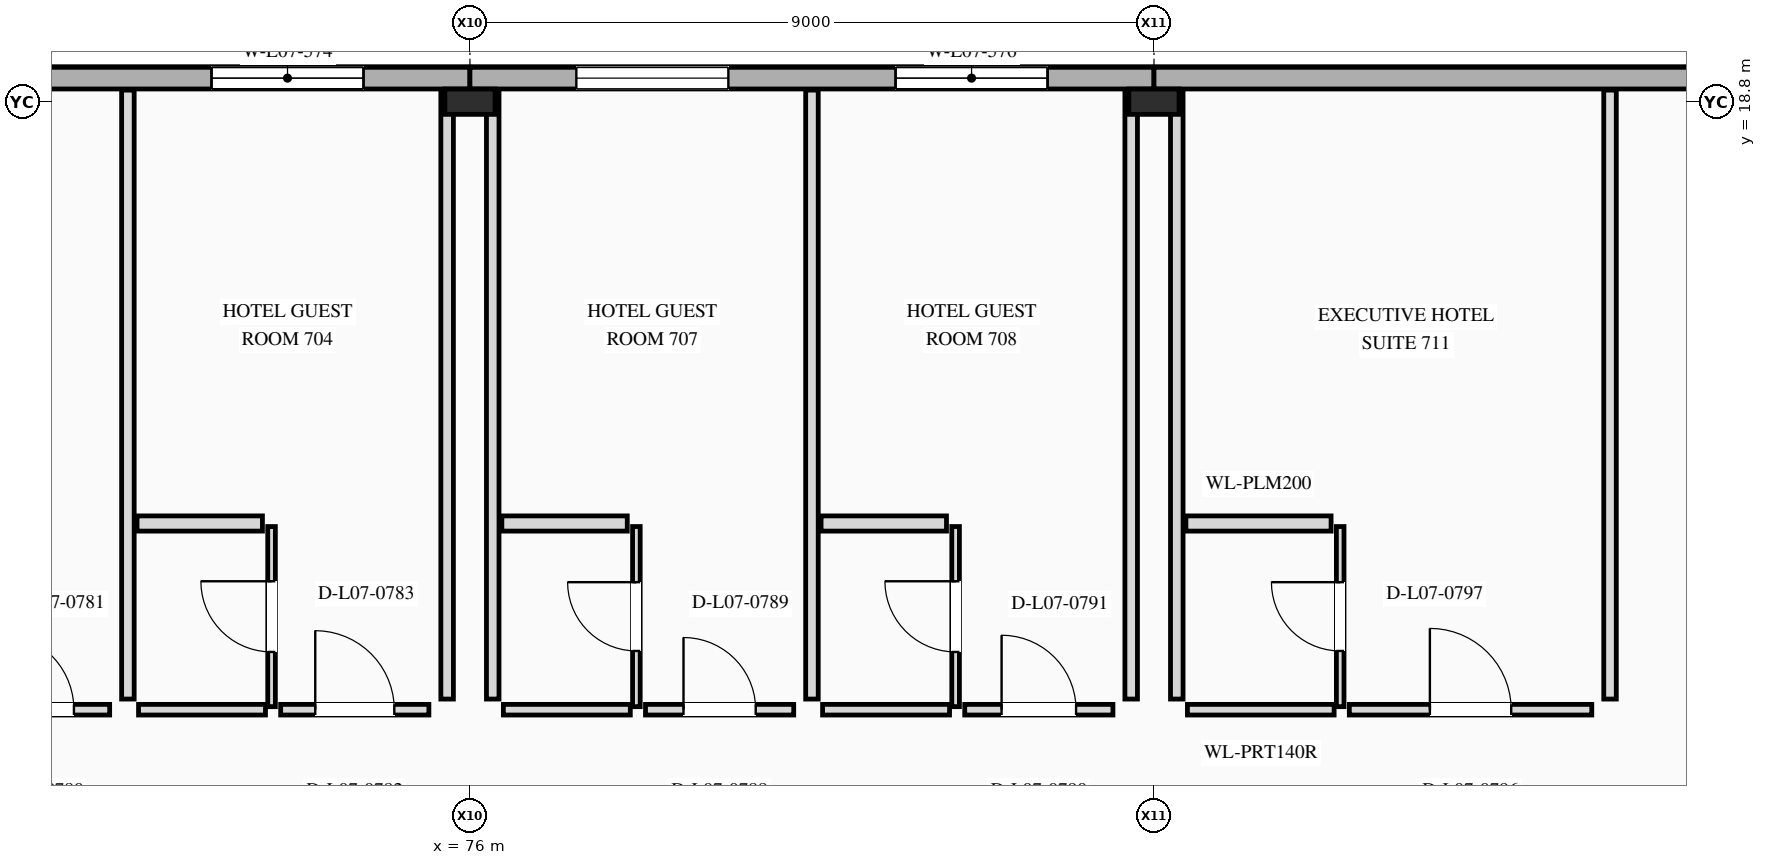
"""IFC4 building model, lengths in metres.
Left out: names, types, materials, properties, quantities, classifications, styles, units other than length and angle.
Written with IfcOpenShell. Run it as: python <this file> out.ifc"""

import sys

from ifc_helpers import new_model, si_unit, direction, frame, frame_2d, origin, origin_2d, place, context, subcontext, project, spatial, rectangle, i_section, extrude, element, fill, save


model = new_model("IFC4")
c1 = context("Model", 3, precision=1e-05, world=origin(), true_north=direction((0.0, 1.0)))
c2 = subcontext(c1, "Body", "Model", "MODEL_VIEW")
j1 = project(units=[si_unit("LENGTHUNIT", "METRE"), si_unit("PLANEANGLEUNIT", "RADIAN")], contexts=[c1])
p1 = place(None, origin())
s1 = spatial("IfcSite", under=j1, at=p1, CompositionType="ELEMENT")
p2 = place(p1, origin())
s2 = spatial("IfcBuilding", under=s1, at=p2, CompositionType="ELEMENT")
p3 = place(p2, frame((0.0, 0.0, 30.6)))
s3 = spatial("IfcBuildingStorey", under=s2, at=p3, CompositionType="ELEMENT", Elevation=30.6)
for number, where, z_axis, x_axis in (
    (1, (76.0, 18.8, 0.0), (0.0, 0.0, 1.0), (0.0, 1.0, 0.0)),
    (2, (85.0, 18.8, 0.0), (0.0, 0.0, 1.0), (0.0, 1.0, 0.0)),
):
    element("IfcColumn", number, at=place(p3, frame(where, z_axis=z_axis, x_axis=x_axis)), inside=s3, PredefinedType="COLUMN", context=c2, shape_type="SweptSolid", body=[
        extrude(i_section(OverallWidth=0.333, OverallDepth=0.66, WebThickness=0.024, FlangeThickness=0.044, at=origin_2d()), origin(), (0.0, 0.0, 1.0), 3.5),
    ])
p4 = place(p3, frame((76.0, 19.11, 0.0), z_axis=(0.0, 0.0, 1.0), x_axis=(-1.0, 0.0, 0.0)))
e3 = element("IfcWall", 3, at=p4, inside=s3, PredefinedType="STANDARD", context=c2, shape_type="SweptSolid", body=[
    extrude(rectangle(XDim=9.31, YDim=0.285, at=frame_2d((4.655, 0.0))), origin(), (0.0, 0.0, 1.0), 3.5),
])
p5 = place(p4, frame((5.6, 0.0, 0.85)))
e4 = element("IfcOpeningElement", 4, at=p5, cuts=e3, PredefinedType="OPENING", context=c2, shape_type="SweptSolid", body=[
    extrude(rectangle(XDim=2.0, YDim=1.65, at=frame_2d((1.0, 0.825))), frame((0.0, 0.152, 0.0), z_axis=(0.0, -1.0, 0.0), x_axis=(1.0, 0.0, 0.0)), (0.0, 0.0, 1.0), 0.305),
])
p6 = place(p4, frame((1.4, 0.0, 0.85)))
e5 = element("IfcOpeningElement", 5, at=p6, cuts=e3, PredefinedType="OPENING", context=c2, shape_type="SweptSolid", body=[
    extrude(rectangle(XDim=2.0, YDim=1.65, at=frame_2d((1.0, 0.825))), frame((0.0, 0.152, 0.0), z_axis=(0.0, -1.0, 0.0), x_axis=(1.0, 0.0, 0.0)), (0.0, 0.0, 1.0), 0.305),
])
p7 = place(p3, frame((85.0, 19.11, 0.0), z_axis=(0.0, 0.0, 1.0), x_axis=(-1.0, 0.0, 0.0)))
e6 = element("IfcWall", 6, at=p7, inside=s3, PredefinedType="STANDARD", context=c2, shape_type="SweptSolid", body=[
    extrude(rectangle(XDim=9.0, YDim=0.285, at=frame_2d((4.5, 0.0))), origin(), (0.0, 0.0, 1.0), 3.5),
])
p8 = place(p7, frame((5.6, 0.0, 0.85)))
e7 = element("IfcOpeningElement", 7, at=p8, cuts=e6, PredefinedType="OPENING", context=c2, shape_type="SweptSolid", body=[
    extrude(rectangle(XDim=2.0, YDim=1.65, at=frame_2d((1.0, 0.825))), frame((0.0, 0.152, 0.0), z_axis=(0.0, -1.0, 0.0), x_axis=(1.0, 0.0, 0.0)), (0.0, 0.0, 1.0), 0.305),
])
p9 = place(p7, frame((1.4, 0.0, 0.85)))
e8 = element("IfcOpeningElement", 8, at=p9, cuts=e6, PredefinedType="OPENING", context=c2, shape_type="SweptSolid", body=[
    extrude(rectangle(XDim=2.0, YDim=1.65, at=frame_2d((1.0, 0.825))), frame((0.0, 0.152, 0.0), z_axis=(0.0, -1.0, 0.0), x_axis=(1.0, 0.0, 0.0)), (0.0, 0.0, 1.0), 0.305),
])
p10 = place(p3, frame((94.0, 19.11, 0.0), z_axis=(0.0, 0.0, 1.0), x_axis=(-1.0, 0.0, 0.0)))
e9 = element("IfcWall", 9, at=p10, inside=s3, PredefinedType="STANDARD", context=c2, shape_type="SweptSolid", body=[
    extrude(rectangle(XDim=9.0, YDim=0.285, at=frame_2d((4.5, 0.0))), origin(), (0.0, 0.0, 1.0), 3.5),
])
p11 = place(p3, frame((69.31, 10.8, 0.0), z_axis=(0.0, 0.0, 1.0), x_axis=(1.0, 0.0, 0.0)))
e10 = element("IfcWall", 10, at=p11, inside=s3, PredefinedType="PARTITIONING", context=c2, shape_type="SweptSolid", body=[
    extrude(rectangle(XDim=1.95, YDim=0.14, at=frame_2d((0.975, 0.0))), origin(), (0.0, 0.0, 1.0), 3.2),
])
p12 = place(p11, frame((0.47, 0.0, 0.0)))
e11 = element("IfcOpeningElement", 11, at=p12, cuts=e10, PredefinedType="OPENING", context=c2, shape_type="SweptSolid", body=[
    extrude(rectangle(XDim=1.01, YDim=2.35, at=frame_2d((0.505, 1.175))), frame((0.0, 0.08, 0.0), z_axis=(0.0, -1.0, 0.0), x_axis=(1.0, 0.0, 0.0)), (0.0, 0.0, 1.0), 0.16),
])
p13 = place(p3, frame((71.5, 10.94, 0.0), z_axis=(0.0, 0.0, 1.0), x_axis=(0.0, 1.0, 0.0)))
e12 = element("IfcWall", 12, at=p13, inside=s3, PredefinedType="PARTITIONING", context=c2, shape_type="SweptSolid", body=[
    extrude(rectangle(XDim=8.012, YDim=0.165, at=frame_2d((4.006, 0.0))), origin(), (0.0, 0.0, 1.0), 2.613),
])
p14 = place(p3, frame((71.64, 10.8, 0.0), z_axis=(0.0, 0.0, 1.0), x_axis=(1.0, 0.0, 0.0)))
e13 = element("IfcWall", 13, at=p14, inside=s3, PredefinedType="PARTITIONING", context=c2, shape_type="SweptSolid", body=[
    extrude(rectangle(XDim=1.67, YDim=0.14, at=frame_2d((0.835, 0.0))), origin(), (0.0, 0.0, 1.0), 3.2),
])
p15 = place(p3, frame((73.51, 10.8, 0.0), z_axis=(0.0, 0.0, 1.0), x_axis=(1.0, 0.0, 0.0)))
e14 = element("IfcWall", 14, at=p15, inside=s3, PredefinedType="PARTITIONING", context=c2, shape_type="SweptSolid", body=[
    extrude(rectangle(XDim=1.95, YDim=0.14, at=frame_2d((0.975, 0.0))), origin(), (0.0, 0.0, 1.0), 3.2),
])
p16 = place(p15, frame((0.455, 0.0, 0.0)))
e15 = element("IfcOpeningElement", 15, at=p16, cuts=e14, PredefinedType="OPENING", context=c2, shape_type="SweptSolid", body=[
    extrude(rectangle(XDim=1.04, YDim=2.4, at=frame_2d((0.52, 1.2))), frame((0.0, 0.08, 0.0), z_axis=(0.0, -1.0, 0.0), x_axis=(1.0, 0.0, 0.0)), (0.0, 0.0, 1.0), 0.16),
])
p17 = place(p3, frame((75.7, 10.94, 0.0), z_axis=(0.0, 0.0, 1.0), x_axis=(0.0, 1.0, 0.0)))
e16 = element("IfcWall", 16, at=p17, inside=s3, PredefinedType="PARTITIONING", context=c2, shape_type="SweptSolid", body=[
    extrude(rectangle(XDim=8.012, YDim=0.165, at=frame_2d((4.006, 0.0))), origin(), (0.0, 0.0, 1.0), 2.529),
])
p18 = place(p3, frame((73.39, 10.84, 0.0), z_axis=(0.0, 0.0, 1.0), x_axis=(0.0, 1.0, 0.0)))
e17 = element("IfcWall", 17, at=p18, inside=s3, PredefinedType="PARTITIONING", context=c2, shape_type="SweptSolid", body=[
    extrude(rectangle(XDim=2.37, YDim=0.1, at=frame_2d((1.185, 0.0))), origin(), (0.0, 0.0, 1.0), 2.808),
])
p19 = place(p18, frame((0.72, 0.0, 0.0)))
e18 = element("IfcOpeningElement", 18, at=p19, cuts=e17, PredefinedType="OPENING", context=c2, shape_type="SweptSolid", body=[
    extrude(rectangle(XDim=0.93, YDim=2.14, at=frame_2d((0.465, 1.07))), frame((0.0, 0.06, 0.0), z_axis=(0.0, -1.0, 0.0), x_axis=(1.0, 0.0, 0.0)), (0.0, 0.0, 1.0), 0.12),
])
p20 = place(p3, frame((71.62, 13.25, 0.0), z_axis=(0.0, 0.0, 1.0), x_axis=(1.0, 0.0, 0.0)))
e19 = element("IfcWall", 19, at=p20, inside=s3, PredefinedType="PLUMBINGWALL", context=c2, shape_type="SweptSolid", body=[
    extrude(rectangle(XDim=1.65, YDim=0.2, at=frame_2d((0.825, 0.0))), origin(), (0.0, 0.0, 1.0), 3.2),
])
p21 = place(p3, frame((76.44, 10.8, 0.0), z_axis=(0.0, 0.0, 1.0), x_axis=(1.0, 0.0, 0.0)))
e20 = element("IfcWall", 20, at=p21, inside=s3, PredefinedType="PARTITIONING", context=c2, shape_type="SweptSolid", body=[
    extrude(rectangle(XDim=1.67, YDim=0.14, at=frame_2d((0.835, 0.0))), origin(), (0.0, 0.0, 1.0), 3.2),
])
p22 = place(p3, frame((78.31, 10.8, 0.0), z_axis=(0.0, 0.0, 1.0), x_axis=(1.0, 0.0, 0.0)))
e21 = element("IfcWall", 21, at=p22, inside=s3, PredefinedType="PARTITIONING", context=c2, shape_type="SweptSolid", body=[
    extrude(rectangle(XDim=1.95, YDim=0.14, at=frame_2d((0.975, 0.0))), origin(), (0.0, 0.0, 1.0), 3.2),
])
p23 = place(p22, frame((0.5, 0.0, 0.0)))
e22 = element("IfcOpeningElement", 22, at=p23, cuts=e21, PredefinedType="OPENING", context=c2, shape_type="SweptSolid", body=[
    extrude(rectangle(XDim=0.95, YDim=2.15, at=frame_2d((0.475, 1.075))), frame((0.0, 0.08, 0.0), z_axis=(0.0, -1.0, 0.0), x_axis=(1.0, 0.0, 0.0)), (0.0, 0.0, 1.0), 0.16),
])
p24 = place(p3, frame((76.3, 10.94, 0.0), z_axis=(0.0, 0.0, 1.0), x_axis=(0.0, 1.0, 0.0)))
e23 = element("IfcWall", 23, at=p24, inside=s3, PredefinedType="PARTITIONING", context=c2, shape_type="SweptSolid", body=[
    extrude(rectangle(XDim=8.012, YDim=0.165, at=frame_2d((4.006, 0.0))), origin(), (0.0, 0.0, 1.0), 2.529),
])
p25 = place(p3, frame((80.5, 10.94, 0.0), z_axis=(0.0, 0.0, 1.0), x_axis=(0.0, 1.0, 0.0)))
e24 = element("IfcWall", 24, at=p25, inside=s3, PredefinedType="PARTITIONING", context=c2, shape_type="SweptSolid", body=[
    extrude(rectangle(XDim=8.012, YDim=0.165, at=frame_2d((4.006, 0.0))), origin(), (0.0, 0.0, 1.0), 2.613),
])
p26 = place(p3, frame((78.19, 10.84, 0.0), z_axis=(0.0, 0.0, 1.0), x_axis=(0.0, 1.0, 0.0)))
e25 = element("IfcWall", 25, at=p26, inside=s3, PredefinedType="PARTITIONING", context=c2, shape_type="SweptSolid", body=[
    extrude(rectangle(XDim=2.37, YDim=0.1, at=frame_2d((1.185, 0.0))), origin(), (0.0, 0.0, 1.0), 2.808),
])
p27 = place(p26, frame((0.733, 0.0, 0.0)))
e26 = element("IfcOpeningElement", 26, at=p27, cuts=e25, PredefinedType="OPENING", context=c2, shape_type="SweptSolid", body=[
    extrude(rectangle(XDim=0.905, YDim=2.18, at=frame_2d((0.453, 1.09))), frame((0.0, 0.06, 0.0), z_axis=(0.0, -1.0, 0.0), x_axis=(1.0, 0.0, 0.0)), (0.0, 0.0, 1.0), 0.12),
])
p28 = place(p3, frame((76.42, 13.25, 0.0), z_axis=(0.0, 0.0, 1.0), x_axis=(1.0, 0.0, 0.0)))
e27 = element("IfcWall", 27, at=p28, inside=s3, PredefinedType="PLUMBINGWALL", context=c2, shape_type="SweptSolid", body=[
    extrude(rectangle(XDim=1.65, YDim=0.2, at=frame_2d((0.825, 0.0))), origin(), (0.0, 0.0, 1.0), 3.2),
])
p29 = place(p3, frame((80.64, 10.8, 0.0), z_axis=(0.0, 0.0, 1.0), x_axis=(1.0, 0.0, 0.0)))
e28 = element("IfcWall", 28, at=p29, inside=s3, PredefinedType="PARTITIONING", context=c2, shape_type="SweptSolid", body=[
    extrude(rectangle(XDim=1.67, YDim=0.14, at=frame_2d((0.835, 0.0))), origin(), (0.0, 0.0, 1.0), 3.2),
])
p30 = place(p3, frame((82.51, 10.8, 0.0), z_axis=(0.0, 0.0, 1.0), x_axis=(1.0, 0.0, 0.0)))
e29 = element("IfcWall", 29, at=p30, inside=s3, PredefinedType="PARTITIONING", context=c2, shape_type="SweptSolid", body=[
    extrude(rectangle(XDim=1.95, YDim=0.14, at=frame_2d((0.975, 0.0))), origin(), (0.0, 0.0, 1.0), 3.2),
])
p31 = place(p30, frame((0.485, 0.0, 0.0)))
e30 = element("IfcOpeningElement", 30, at=p31, cuts=e29, PredefinedType="OPENING", context=c2, shape_type="SweptSolid", body=[
    extrude(rectangle(XDim=0.98, YDim=2.2, at=frame_2d((0.49, 1.1))), frame((0.0, 0.08, 0.0), z_axis=(0.0, -1.0, 0.0), x_axis=(1.0, 0.0, 0.0)), (0.0, 0.0, 1.0), 0.16),
])
p32 = place(p3, frame((84.7, 10.94, 0.0), z_axis=(0.0, 0.0, 1.0), x_axis=(0.0, 1.0, 0.0)))
e31 = element("IfcWall", 31, at=p32, inside=s3, PredefinedType="PARTITIONING", context=c2, shape_type="SweptSolid", body=[
    extrude(rectangle(XDim=8.012, YDim=0.165, at=frame_2d((4.006, 0.0))), origin(), (0.0, 0.0, 1.0), 2.529),
])
p33 = place(p3, frame((82.39, 10.84, 0.0), z_axis=(0.0, 0.0, 1.0), x_axis=(0.0, 1.0, 0.0)))
e32 = element("IfcWall", 32, at=p33, inside=s3, PredefinedType="PARTITIONING", context=c2, shape_type="SweptSolid", body=[
    extrude(rectangle(XDim=2.37, YDim=0.1, at=frame_2d((1.185, 0.0))), origin(), (0.0, 0.0, 1.0), 2.808),
])
p34 = place(p33, frame((0.72, 0.0, 0.0)))
e33 = element("IfcOpeningElement", 33, at=p34, cuts=e32, PredefinedType="OPENING", context=c2, shape_type="SweptSolid", body=[
    extrude(rectangle(XDim=0.93, YDim=2.22, at=frame_2d((0.465, 1.11))), frame((0.0, 0.06, 0.0), z_axis=(0.0, -1.0, 0.0), x_axis=(1.0, 0.0, 0.0)), (0.0, 0.0, 1.0), 0.12),
])
p35 = place(p3, frame((80.62, 13.25, 0.0), z_axis=(0.0, 0.0, 1.0), x_axis=(1.0, 0.0, 0.0)))
e34 = element("IfcWall", 34, at=p35, inside=s3, PredefinedType="PLUMBINGWALL", context=c2, shape_type="SweptSolid", body=[
    extrude(rectangle(XDim=1.65, YDim=0.2, at=frame_2d((0.825, 0.0))), origin(), (0.0, 0.0, 1.0), 3.2),
])
p36 = place(p3, frame((85.44, 10.8, 0.0), z_axis=(0.0, 0.0, 1.0), x_axis=(1.0, 0.0, 0.0)))
e35 = element("IfcWall", 35, at=p36, inside=s3, PredefinedType="PARTITIONING", context=c2, shape_type="SweptSolid", body=[
    extrude(rectangle(XDim=1.93, YDim=0.14, at=frame_2d((0.965, 0.0))), origin(), (0.0, 0.0, 1.0), 3.2),
])
p37 = place(p3, frame((87.57, 10.8, 0.0), z_axis=(0.0, 0.0, 1.0), x_axis=(1.0, 0.0, 0.0)))
e36 = element("IfcWall", 36, at=p37, inside=s3, PredefinedType="PARTITIONING", context=c2, shape_type="SweptSolid", body=[
    extrude(rectangle(XDim=3.19, YDim=0.14, at=frame_2d((1.595, 0.0))), origin(), (0.0, 0.0, 1.0), 3.2),
])
p38 = place(p37, frame((1.06, 0.0, 0.0)))
e37 = element("IfcOpeningElement", 37, at=p38, cuts=e36, PredefinedType="OPENING", context=c2, shape_type="SweptSolid", body=[
    extrude(rectangle(XDim=1.07, YDim=2.25, at=frame_2d((0.535, 1.125))), frame((0.0, 0.08, 0.0), z_axis=(0.0, -1.0, 0.0), x_axis=(1.0, 0.0, 0.0)), (0.0, 0.0, 1.0), 0.16),
])
p39 = place(p3, frame((85.3, 10.94, 0.0), z_axis=(0.0, 0.0, 1.0), x_axis=(0.0, 1.0, 0.0)))
e38 = element("IfcWall", 38, at=p39, inside=s3, PredefinedType="PARTITIONING", context=c2, shape_type="SweptSolid", body=[
    extrude(rectangle(XDim=8.012, YDim=0.165, at=frame_2d((4.006, 0.0))), origin(), (0.0, 0.0, 1.0), 2.529),
])
p40 = place(p3, frame((91.0, 10.94, 0.0), z_axis=(0.0, 0.0, 1.0), x_axis=(0.0, 1.0, 0.0)))
e39 = element("IfcWall", 39, at=p40, inside=s3, PredefinedType="PARTITIONING", context=c2, shape_type="SweptSolid", body=[
    extrude(rectangle(XDim=8.012, YDim=0.165, at=frame_2d((4.006, 0.0))), origin(), (0.0, 0.0, 1.0), 3.2),
])
p41 = place(p3, frame((87.45, 10.84, 0.0), z_axis=(0.0, 0.0, 1.0), x_axis=(0.0, 1.0, 0.0)))
e40 = element("IfcWall", 40, at=p41, inside=s3, PredefinedType="PARTITIONING", context=c2, shape_type="SweptSolid", body=[
    extrude(rectangle(XDim=2.37, YDim=0.1, at=frame_2d((1.185, 0.0))), origin(), (0.0, 0.0, 1.0), 3.2),
])
p42 = place(p41, frame((0.733, 0.0, 0.0)))
e41 = element("IfcOpeningElement", 41, at=p42, cuts=e40, PredefinedType="OPENING", context=c2, shape_type="SweptSolid", body=[
    extrude(rectangle(XDim=0.905, YDim=2.1, at=frame_2d((0.453, 1.05))), frame((0.0, 0.06, 0.0), z_axis=(0.0, -1.0, 0.0), x_axis=(1.0, 0.0, 0.0)), (0.0, 0.0, 1.0), 0.12),
])
p43 = place(p3, frame((85.42, 13.25, 0.0), z_axis=(0.0, 0.0, 1.0), x_axis=(1.0, 0.0, 0.0)))
e42 = element("IfcWall", 42, at=p43, inside=s3, PredefinedType="PLUMBINGWALL", context=c2, shape_type="SweptSolid", body=[
    extrude(rectangle(XDim=1.91, YDim=0.2, at=frame_2d((0.955, 0.0))), origin(), (0.0, 0.0, 1.0), 3.2),
])
p44 = place(p6, origin())
e43 = element("IfcWindow", 43, at=p44, inside=s3, PartitioningType="SINGLE_PANEL", PredefinedType="WINDOW", context=c2, shape_type="SweptSolid", body=[
    extrude(rectangle(XDim=2.0, YDim=1.65, at=frame_2d((1.0, 0.825))), frame((0.0, 0.03, 0.0), z_axis=(0.0, -1.0, 0.0), x_axis=(1.0, 0.0, 0.0)), (0.0, 0.0, 1.0), 0.06),
])
fill(e5, e43)
p45 = place(p8, origin())
e44 = element("IfcWindow", 44, at=p45, inside=s3, PartitioningType="SINGLE_PANEL", PredefinedType="WINDOW", context=c2, shape_type="SweptSolid", body=[
    extrude(rectangle(XDim=2.0, YDim=1.65, at=frame_2d((1.0, 0.825))), frame((0.0, 0.03, 0.0), z_axis=(0.0, -1.0, 0.0), x_axis=(1.0, 0.0, 0.0)), (0.0, 0.0, 1.0), 0.06),
])
fill(e7, e44)
p46 = place(p9, origin())
e45 = element("IfcWindow", 45, at=p46, inside=s3, PartitioningType="SINGLE_PANEL", PredefinedType="WINDOW", context=c2, shape_type="SweptSolid", body=[
    extrude(rectangle(XDim=2.0, YDim=1.65, at=frame_2d((1.0, 0.825))), frame((0.0, 0.03, 0.0), z_axis=(0.0, -1.0, 0.0), x_axis=(1.0, 0.0, 0.0)), (0.0, 0.0, 1.0), 0.06),
])
fill(e8, e45)
p47 = place(p12, origin())
e46 = element("IfcDoor", 46, at=p47, inside=s3, OperationType="SINGLE_SWING_LEFT", PredefinedType="DOOR", context=c2, shape_type="SweptSolid", body=[
    extrude(rectangle(XDim=1.01, YDim=2.35, at=frame_2d((0.505, 1.175))), frame((0.0, 0.025, 0.0), z_axis=(0.0, -1.0, 0.0), x_axis=(1.0, 0.0, 0.0)), (0.0, 0.0, 1.0), 0.05),
])
fill(e11, e46)
p48 = place(p16, origin())
e47 = element("IfcDoor", 47, at=p48, inside=s3, OperationType="SINGLE_SWING_LEFT", PredefinedType="DOOR", context=c2, shape_type="SweptSolid", body=[
    extrude(rectangle(XDim=1.04, YDim=2.4, at=frame_2d((0.52, 1.2))), frame((0.0, 0.025, 0.0), z_axis=(0.0, -1.0, 0.0), x_axis=(1.0, 0.0, 0.0)), (0.0, 0.0, 1.0), 0.05),
])
fill(e15, e47)
p49 = place(p19, origin())
e48 = element("IfcDoor", 48, at=p49, inside=s3, OperationType="SINGLE_SWING_RIGHT", PredefinedType="DOOR", context=c2, shape_type="SweptSolid", body=[
    extrude(rectangle(XDim=0.93, YDim=2.14, at=frame_2d((0.465, 1.07))), frame((0.0, 0.025, 0.0), z_axis=(0.0, -1.0, 0.0), x_axis=(1.0, 0.0, 0.0)), (0.0, 0.0, 1.0), 0.05),
])
fill(e18, e48)
p50 = place(p23, origin())
e49 = element("IfcDoor", 49, at=p50, inside=s3, OperationType="SINGLE_SWING_LEFT", PredefinedType="DOOR", context=c2, shape_type="SweptSolid", body=[
    extrude(rectangle(XDim=0.95, YDim=2.15, at=frame_2d((0.475, 1.075))), frame((0.0, 0.025, 0.0), z_axis=(0.0, -1.0, 0.0), x_axis=(1.0, 0.0, 0.0)), (0.0, 0.0, 1.0), 0.05),
])
fill(e22, e49)
p51 = place(p27, origin())
e50 = element("IfcDoor", 50, at=p51, inside=s3, OperationType="SINGLE_SWING_RIGHT", PredefinedType="DOOR", context=c2, shape_type="SweptSolid", body=[
    extrude(rectangle(XDim=0.905, YDim=2.18, at=frame_2d((0.453, 1.09))), frame((0.0, 0.025, 0.0), z_axis=(0.0, -1.0, 0.0), x_axis=(1.0, 0.0, 0.0)), (0.0, 0.0, 1.0), 0.05),
])
fill(e26, e50)
p52 = place(p31, origin())
e51 = element("IfcDoor", 51, at=p52, inside=s3, OperationType="SINGLE_SWING_LEFT", PredefinedType="DOOR", context=c2, shape_type="SweptSolid", body=[
    extrude(rectangle(XDim=0.98, YDim=2.2, at=frame_2d((0.49, 1.1))), frame((0.0, 0.025, 0.0), z_axis=(0.0, -1.0, 0.0), x_axis=(1.0, 0.0, 0.0)), (0.0, 0.0, 1.0), 0.05),
])
fill(e30, e51)
p53 = place(p34, origin())
e52 = element("IfcDoor", 52, at=p53, inside=s3, OperationType="SINGLE_SWING_RIGHT", PredefinedType="DOOR", context=c2, shape_type="SweptSolid", body=[
    extrude(rectangle(XDim=0.93, YDim=2.22, at=frame_2d((0.465, 1.11))), frame((0.0, 0.025, 0.0), z_axis=(0.0, -1.0, 0.0), x_axis=(1.0, 0.0, 0.0)), (0.0, 0.0, 1.0), 0.05),
])
fill(e33, e52)
p54 = place(p38, origin())
e53 = element("IfcDoor", 53, at=p54, inside=s3, OperationType="SINGLE_SWING_LEFT", PredefinedType="DOOR", context=c2, shape_type="SweptSolid", body=[
    extrude(rectangle(XDim=1.07, YDim=2.25, at=frame_2d((0.535, 1.125))), frame((0.0, 0.025, 0.0), z_axis=(0.0, -1.0, 0.0), x_axis=(1.0, 0.0, 0.0)), (0.0, 0.0, 1.0), 0.05),
])
fill(e37, e53)
p55 = place(p42, origin())
e54 = element("IfcDoor", 54, at=p55, inside=s3, OperationType="SINGLE_SWING_RIGHT", PredefinedType="DOOR", context=c2, shape_type="SweptSolid", body=[
    extrude(rectangle(XDim=0.905, YDim=2.1, at=frame_2d((0.453, 1.05))), frame((0.0, 0.025, 0.0), z_axis=(0.0, -1.0, 0.0), x_axis=(1.0, 0.0, 0.0)), (0.0, 0.0, 1.0), 0.05),
])
fill(e41, e54)
save(model, sys.argv[1])
